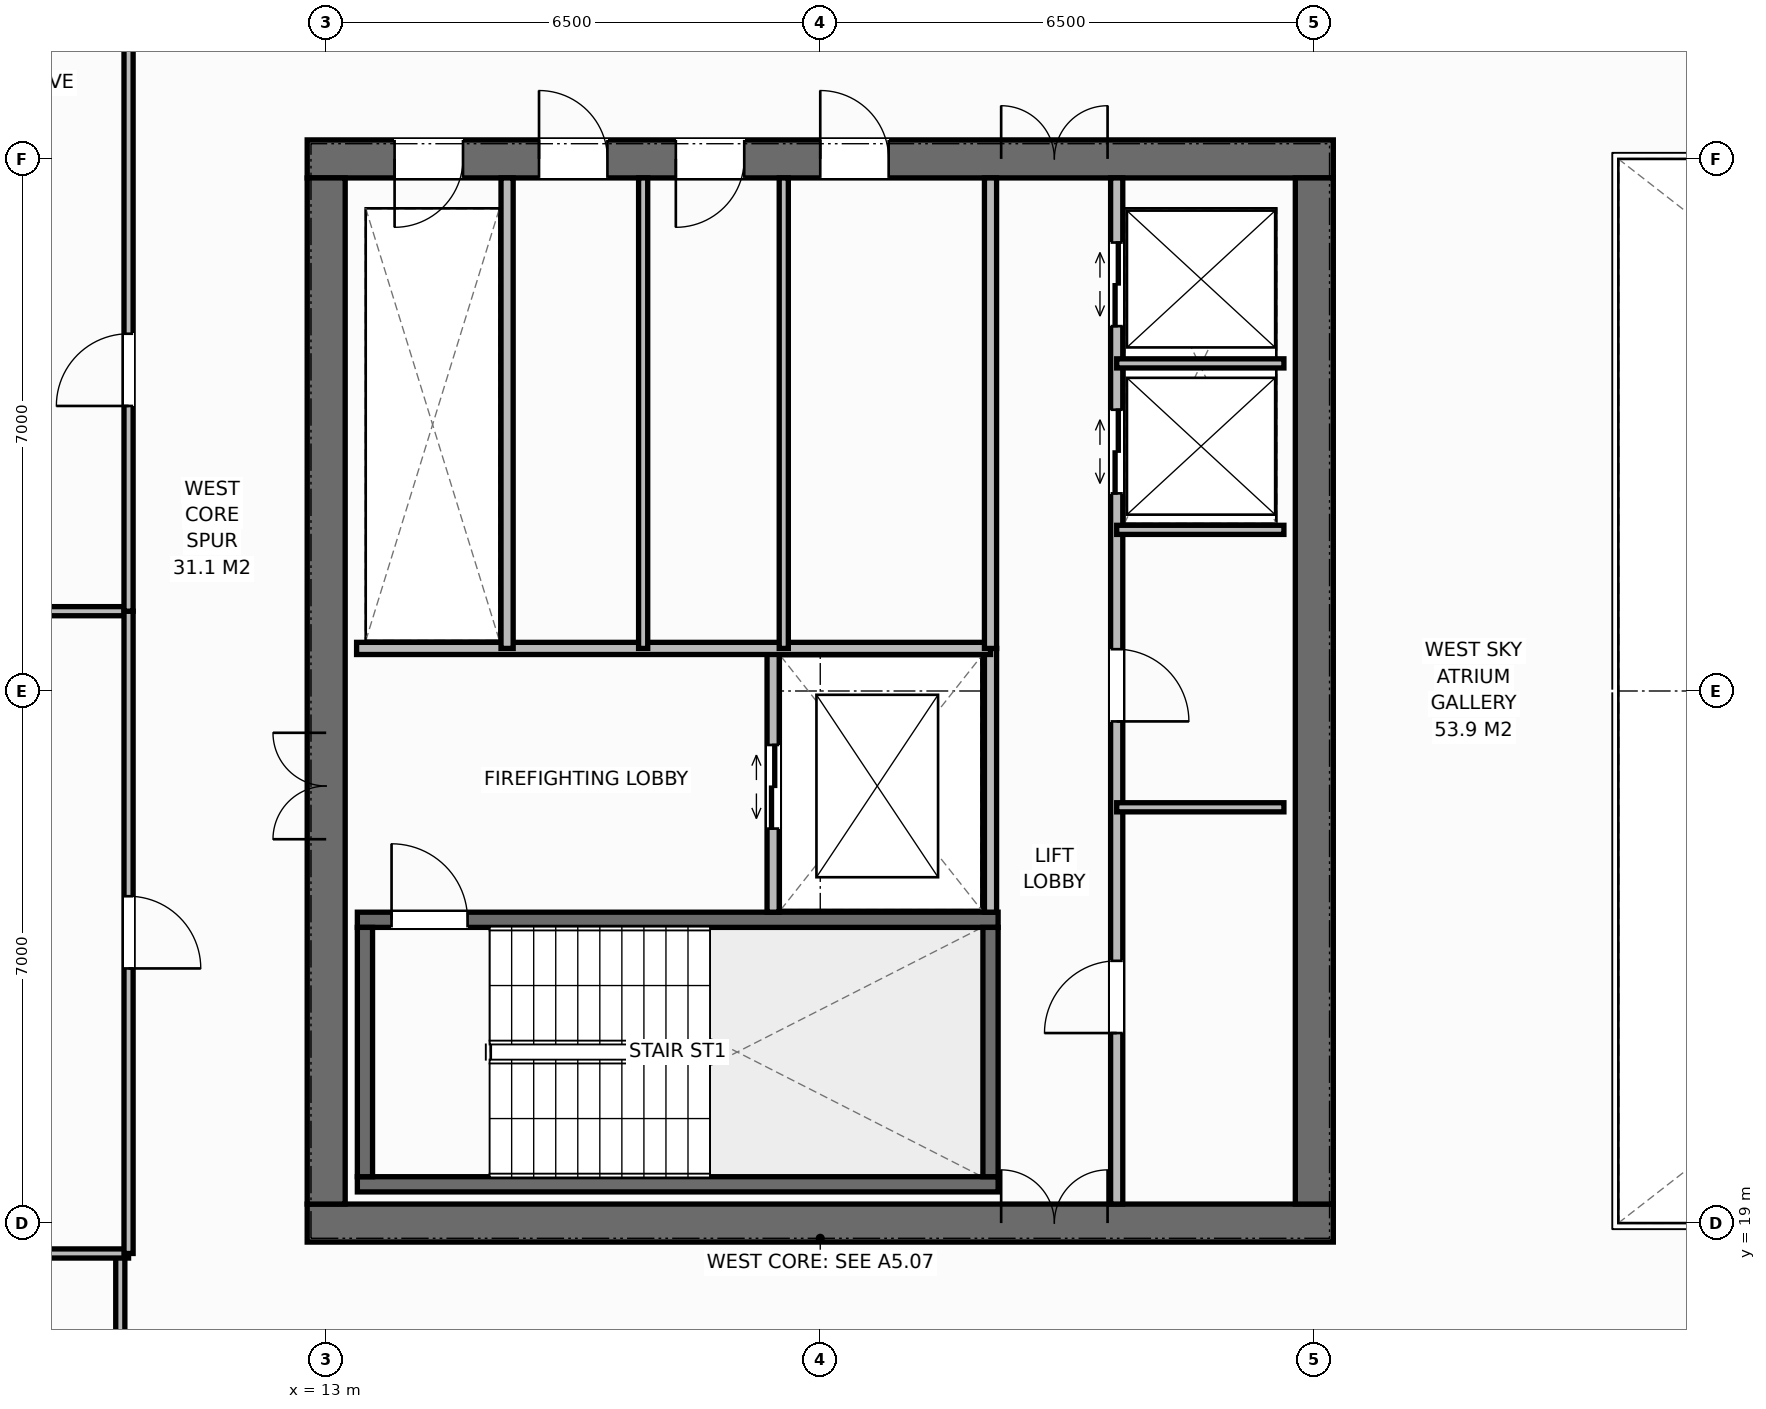
"""IFC4 building model, lengths in metres.
Left out: names, types, materials, properties, quantities, classifications, styles, units other than length and angle.
Written with IfcOpenShell. Run it as: python <this file> out.ifc"""

import sys

from ifc_helpers import new_model, si_unit, direction, frame, frame_2d, origin, place, context, subcontext, project, spatial, rectangle, extrude, element, fill, save


model = new_model("IFC4")
c1 = context("Model", 3, precision=1e-05, world=origin(), true_north=direction((0.0, 1.0)))
c2 = subcontext(c1, "Body", "Model", "MODEL_VIEW")
j1 = project(units=[si_unit("LENGTHUNIT", "METRE"), si_unit("PLANEANGLEUNIT", "RADIAN")], contexts=[c1])
p1 = place(None, origin())
s1 = spatial("IfcSite", under=j1, at=p1, CompositionType="ELEMENT")
p2 = place(p1, origin())
s2 = spatial("IfcBuilding", under=s1, at=p2, CompositionType="ELEMENT")
p3 = place(p2, frame((0.0, 0.0, 221.4)))
s3 = spatial("IfcBuildingStorey", under=s2, at=p3, CompositionType="ELEMENT", Elevation=221.4)
p4 = place(p3, frame((12.75, 19.0, 0.0), z_axis=(0.0, 0.0, 1.0), x_axis=(1.0, 0.0, 0.0)))
e1 = element("IfcWall", 1, at=p4, inside=s3, PredefinedType="SHEAR", context=c2, shape_type="SweptSolid", body=[
    extrude(rectangle(XDim=13.5, YDim=0.5, at=frame_2d((6.75, 0.0))), origin(), (0.0, 0.0, 1.0), 3.8),
])
p5 = place(p4, frame((9.13, 0.0, 0.0)))
e2 = element("IfcOpeningElement", 2, at=p5, cuts=e1, PredefinedType="OPENING", context=c2, shape_type="SweptSolid", body=[
    extrude(rectangle(XDim=1.4, YDim=2.2, at=frame_2d((0.7, 1.1))), frame((0.0, 0.26, 0.0), z_axis=(0.0, -1.0, 0.0), x_axis=(1.0, 0.0, 0.0)), (0.0, 0.0, 1.0), 0.52),
])
p6 = place(p3, frame((12.75, 33.0, 0.0), z_axis=(0.0, 0.0, 1.0), x_axis=(1.0, 0.0, 0.0)))
e3 = element("IfcWall", 3, at=p6, inside=s3, PredefinedType="SHEAR", context=c2, shape_type="SweptSolid", body=[
    extrude(rectangle(XDim=13.5, YDim=0.5, at=frame_2d((6.75, 0.0))), origin(), (0.0, 0.0, 1.0), 3.8),
])
p7 = place(p6, frame((1.15, 0.0, 0.0)))
e4 = element("IfcOpeningElement", 4, at=p7, cuts=e3, PredefinedType="OPENING", context=c2, shape_type="SweptSolid", body=[
    extrude(rectangle(XDim=0.9, YDim=2.15, at=frame_2d((0.45, 1.075))), frame((0.0, 0.26, 0.0), z_axis=(0.0, -1.0, 0.0), x_axis=(1.0, 0.0, 0.0)), (0.0, 0.0, 1.0), 0.52),
])
p8 = place(p6, frame((3.05, 0.0, 0.0)))
e5 = element("IfcOpeningElement", 5, at=p8, cuts=e3, PredefinedType="OPENING", context=c2, shape_type="SweptSolid", body=[
    extrude(rectangle(XDim=0.9, YDim=2.15, at=frame_2d((0.45, 1.075))), frame((0.0, 0.26, 0.0), z_axis=(0.0, -1.0, 0.0), x_axis=(1.0, 0.0, 0.0)), (0.0, 0.0, 1.0), 0.52),
])
p9 = place(p6, frame((4.85, 0.0, 0.0)))
e6 = element("IfcOpeningElement", 6, at=p9, cuts=e3, PredefinedType="OPENING", context=c2, shape_type="SweptSolid", body=[
    extrude(rectangle(XDim=0.9, YDim=2.15, at=frame_2d((0.45, 1.075))), frame((0.0, 0.26, 0.0), z_axis=(0.0, -1.0, 0.0), x_axis=(1.0, 0.0, 0.0)), (0.0, 0.0, 1.0), 0.52),
])
p10 = place(p6, frame((6.75, 0.0, 0.0)))
e7 = element("IfcOpeningElement", 7, at=p10, cuts=e3, PredefinedType="OPENING", context=c2, shape_type="SweptSolid", body=[
    extrude(rectangle(XDim=0.9, YDim=2.15, at=frame_2d((0.45, 1.075))), frame((0.0, 0.26, 0.0), z_axis=(0.0, -1.0, 0.0), x_axis=(1.0, 0.0, 0.0)), (0.0, 0.0, 1.0), 0.52),
])
p11 = place(p6, frame((9.13, 0.0, 0.0)))
e8 = element("IfcOpeningElement", 8, at=p11, cuts=e3, PredefinedType="OPENING", context=c2, shape_type="SweptSolid", body=[
    extrude(rectangle(XDim=1.4, YDim=2.2, at=frame_2d((0.7, 1.1))), frame((0.0, 0.26, 0.0), z_axis=(0.0, -1.0, 0.0), x_axis=(1.0, 0.0, 0.0)), (0.0, 0.0, 1.0), 0.52),
])
p12 = place(p3, frame((13.0, 19.25, 0.0), z_axis=(0.0, 0.0, 1.0), x_axis=(0.0, 1.0, 0.0)))
e9 = element("IfcWall", 9, at=p12, inside=s3, PredefinedType="SHEAR", context=c2, shape_type="SweptSolid", body=[
    extrude(rectangle(XDim=13.5, YDim=0.5, at=frame_2d((6.75, 0.0))), origin(), (0.0, 0.0, 1.0), 3.8),
])
p13 = place(p12, frame((4.8, 0.0, 0.0)))
e10 = element("IfcOpeningElement", 10, at=p13, cuts=e9, PredefinedType="OPENING", context=c2, shape_type="SweptSolid", body=[
    extrude(rectangle(XDim=1.4, YDim=2.2, at=frame_2d((0.7, 1.1))), frame((0.0, 0.26, 0.0), z_axis=(0.0, -1.0, 0.0), x_axis=(1.0, 0.0, 0.0)), (0.0, 0.0, 1.0), 0.52),
])
p14 = place(p3, frame((26.0, 19.25, 0.0), z_axis=(0.0, 0.0, 1.0), x_axis=(0.0, 1.0, 0.0)))
e11 = element("IfcWall", 11, at=p14, inside=s3, PredefinedType="SHEAR", context=c2, shape_type="SweptSolid", body=[
    extrude(rectangle(XDim=13.5, YDim=0.5, at=frame_2d((6.75, 0.0))), origin(), (0.0, 0.0, 1.0), 3.8),
])
p15 = place(p3, frame((13.41, 19.51, 0.0), z_axis=(0.0, 0.0, 1.0), x_axis=(1.0, 0.0, 0.0)))
e12 = element("IfcWall", 12, at=p15, inside=s3, PredefinedType="SHEAR", context=c2, shape_type="SweptSolid", body=[
    extrude(rectangle(XDim=8.43, YDim=0.2, at=frame_2d((4.215, 0.0))), origin(), (0.0, 0.0, 1.0), 3.8),
])
p16 = place(p3, frame((13.41, 22.99, 0.0), z_axis=(0.0, 0.0, 1.0), x_axis=(1.0, 0.0, 0.0)))
e13 = element("IfcWall", 13, at=p16, inside=s3, PredefinedType="SHEAR", context=c2, shape_type="SweptSolid", body=[
    extrude(rectangle(XDim=8.43, YDim=0.2, at=frame_2d((4.215, 0.0))), origin(), (0.0, 0.0, 1.0), 3.8),
])
p17 = place(p16, frame((0.45, 0.0, 0.0)))
e14 = element("IfcOpeningElement", 14, at=p17, cuts=e13, PredefinedType="OPENING", context=c2, shape_type="SweptSolid", body=[
    extrude(rectangle(XDim=1.0, YDim=2.15, at=frame_2d((0.5, 1.075))), frame((0.0, 0.11, 0.0), z_axis=(0.0, -1.0, 0.0), x_axis=(1.0, 0.0, 0.0)), (0.0, 0.0, 1.0), 0.22),
])
for number, where, z_axis, x_axis in (
    (15, (13.51, 19.61, 0.0), (0.0, 0.0, 1.0), (0.0, 1.0, 0.0)),
    (16, (21.74, 19.61, 0.0), (0.0, 0.0, 1.0), (0.0, 1.0, 0.0)),
):
    element("IfcWall", number, at=place(p3, frame(where, z_axis=z_axis, x_axis=x_axis)), inside=s3, PredefinedType="SHEAR", context=c2, shape_type="SweptSolid", body=[
        extrude(rectangle(XDim=3.28, YDim=0.2, at=frame_2d((1.64, 0.0))), origin(), (0.0, 0.0, 1.0), 3.8),
    ])
p18 = place(p3, frame((21.74, 23.09, 0.0), z_axis=(0.0, 0.0, 1.0), x_axis=(0.0, 1.0, 0.0)))
e17 = element("IfcWall", 17, at=p18, inside=s3, PredefinedType="STANDARD", context=c2, shape_type="SweptSolid", body=[
    extrude(rectangle(XDim=3.47, YDim=0.16, at=frame_2d((1.735, 0.0))), origin(), (0.0, 0.0, 1.0), 3.58),
])
p19 = place(p3, frame((18.88, 23.09, 0.0), z_axis=(0.0, 0.0, 1.0), x_axis=(0.0, 1.0, 0.0)))
e18 = element("IfcWall", 18, at=p19, inside=s3, PredefinedType="STANDARD", context=c2, shape_type="SweptSolid", body=[
    extrude(rectangle(XDim=3.47, YDim=0.16, at=frame_2d((1.735, 0.0))), origin(), (0.0, 0.0, 1.0), 3.58),
])
p20 = place(p19, frame((1.1, 0.0, 0.0)))
e19 = element("IfcOpeningElement", 19, at=p20, cuts=e18, PredefinedType="OPENING", context=c2, shape_type="SweptSolid", body=[
    extrude(rectangle(XDim=1.1, YDim=2.2, at=frame_2d((0.55, 1.1))), frame((0.0, 0.09, 0.0), z_axis=(0.0, -1.0, 0.0), x_axis=(1.0, 0.0, 0.0)), (0.0, 0.0, 1.0), 0.18),
])
p21 = place(p3, frame((13.4, 26.56, 0.0), z_axis=(0.0, 0.0, 1.0), x_axis=(1.0, 0.0, 0.0)))
e20 = element("IfcWall", 20, at=p21, inside=s3, PredefinedType="STANDARD", context=c2, shape_type="SweptSolid", body=[
    extrude(rectangle(XDim=8.34, YDim=0.16, at=frame_2d((4.17, 0.0))), origin(), (0.0, 0.0, 1.0), 3.58),
])
p22 = place(p3, frame((15.38, 26.56, 0.0), z_axis=(0.0, 0.0, 1.0), x_axis=(0.0, 1.0, 0.0)))
e21 = element("IfcWall", 21, at=p22, inside=s3, PredefinedType="STANDARD", context=c2, shape_type="SweptSolid", body=[
    extrude(rectangle(XDim=6.19, YDim=0.16, at=frame_2d((3.095, 0.0))), origin(), (0.0, 0.0, 1.0), 3.58),
])
for number, where, z_axis, x_axis in (
    (22, (17.17, 26.56, 0.0), (0.0, 0.0, 1.0), (0.0, 1.0, 0.0)),
    (23, (19.02, 26.56, 0.0), (0.0, 0.0, 1.0), (0.0, 1.0, 0.0)),
):
    element("IfcWall", number, at=place(p3, frame(where, z_axis=z_axis, x_axis=x_axis)), inside=s3, PredefinedType="PARTITIONING", context=c2, shape_type="SweptSolid", body=[
        extrude(rectangle(XDim=6.19, YDim=0.12, at=frame_2d((3.095, 0.0))), origin(), (0.0, 0.0, 1.0), 3.58),
    ])
p23 = place(p3, frame((21.74, 26.56, 0.0), z_axis=(0.0, 0.0, 1.0), x_axis=(0.0, 1.0, 0.0)))
e24 = element("IfcWall", 24, at=p23, inside=s3, PredefinedType="STANDARD", context=c2, shape_type="SweptSolid", body=[
    extrude(rectangle(XDim=6.19, YDim=0.16, at=frame_2d((3.095, 0.0))), origin(), (0.0, 0.0, 1.0), 3.58),
])
p24 = place(p3, frame((23.4, 19.25, 0.0), z_axis=(0.0, 0.0, 1.0), x_axis=(0.0, 1.0, 0.0)))
e25 = element("IfcWall", 25, at=p24, inside=s3, PredefinedType="STANDARD", context=c2, shape_type="SweptSolid", body=[
    extrude(rectangle(XDim=13.5, YDim=0.16, at=frame_2d((6.75, 0.0))), origin(), (0.0, 0.0, 1.0), 3.58),
])
p25 = place(p24, frame((2.25, 0.0, 0.0)))
e26 = element("IfcOpeningElement", 26, at=p25, cuts=e25, PredefinedType="OPENING", context=c2, shape_type="SweptSolid", body=[
    extrude(rectangle(XDim=0.95, YDim=2.15, at=frame_2d((0.475, 1.075))), frame((0.0, 0.09, 0.0), z_axis=(0.0, -1.0, 0.0), x_axis=(1.0, 0.0, 0.0)), (0.0, 0.0, 1.0), 0.18),
])
p26 = place(p24, frame((6.35, 0.0, 0.0)))
e27 = element("IfcOpeningElement", 27, at=p26, cuts=e25, PredefinedType="OPENING", context=c2, shape_type="SweptSolid", body=[
    extrude(rectangle(XDim=0.95, YDim=2.15, at=frame_2d((0.475, 1.075))), frame((0.0, 0.09, 0.0), z_axis=(0.0, -1.0, 0.0), x_axis=(1.0, 0.0, 0.0)), (0.0, 0.0, 1.0), 0.18),
])
p27 = place(p24, frame((9.35, 0.0, 0.0)))
e28 = element("IfcOpeningElement", 28, at=p27, cuts=e25, PredefinedType="OPENING", context=c2, shape_type="SweptSolid", body=[
    extrude(rectangle(XDim=1.1, YDim=2.2, at=frame_2d((0.55, 1.1))), frame((0.0, 0.09, 0.0), z_axis=(0.0, -1.0, 0.0), x_axis=(1.0, 0.0, 0.0)), (0.0, 0.0, 1.0), 0.18),
])
p28 = place(p24, frame((11.55, 0.0, 0.0)))
e29 = element("IfcOpeningElement", 29, at=p28, cuts=e25, PredefinedType="OPENING", context=c2, shape_type="SweptSolid", body=[
    extrude(rectangle(XDim=1.1, YDim=2.2, at=frame_2d((0.55, 1.1))), frame((0.0, 0.09, 0.0), z_axis=(0.0, -1.0, 0.0), x_axis=(1.0, 0.0, 0.0)), (0.0, 0.0, 1.0), 0.18),
])
for number, where, z_axis, x_axis in (
    (30, (23.4, 24.47, 0.0), (0.0, 0.0, 1.0), (1.0, 0.0, 0.0)),
    (31, (23.4, 28.12, 0.0), (0.0, 0.0, 1.0), (1.0, 0.0, 0.0)),
    (32, (23.4, 30.31, 0.0), (0.0, 0.0, 1.0), (1.0, 0.0, 0.0)),
):
    element("IfcWall", number, at=place(p3, frame(where, z_axis=z_axis, x_axis=x_axis)), inside=s3, PredefinedType="PARTITIONING", context=c2, shape_type="SweptSolid", body=[
        extrude(rectangle(XDim=2.2, YDim=0.12, at=frame_2d((1.1, 0.0))), origin(), (0.0, 0.0, 1.0), 3.58),
    ])
p29 = place(p3, frame((10.291, 16.5, 0.0), z_axis=(0.0, 0.0, 1.0), x_axis=(0.0, 1.0, 0.0)))
e33 = element("IfcWall", 33, at=p29, inside=s3, PredefinedType="PARTITIONING", context=c2, shape_type="SweptSolid", body=[
    extrude(rectangle(XDim=2.1, YDim=0.12, at=frame_2d((1.05, 0.0))), origin(), (0.0, 0.0, 1.0), 3.58),
])
for number, where, z_axis, x_axis in (
    (34, (5.82, 18.6, 0.0), (0.0, 0.0, 1.0), (1.0, 0.0, 0.0)),
    (35, (5.82, 27.05, 0.0), (0.0, 0.0, 1.0), (1.0, 0.0, 0.0)),
):
    element("IfcWall", number, at=place(p3, frame(where, z_axis=z_axis, x_axis=x_axis)), inside=s3, PredefinedType="PARTITIONING", context=c2, shape_type="SweptSolid", body=[
        extrude(rectangle(XDim=4.58, YDim=0.12, at=frame_2d((2.29, 0.0))), origin(), (0.0, 0.0, 1.0), 3.58),
    ])
p30 = place(p3, frame((10.4, 18.6, 0.0), z_axis=(0.0, 0.0, 1.0), x_axis=(0.0, 1.0, 0.0)))
e36 = element("IfcWall", 36, at=p30, inside=s3, PredefinedType="PARTITIONING", context=c2, shape_type="SweptSolid", body=[
    extrude(rectangle(XDim=8.45, YDim=0.12, at=frame_2d((4.225, 0.0))), origin(), (0.0, 0.0, 1.0), 3.58),
])
p31 = place(p30, frame((3.75, 0.0, 0.0)))
e37 = element("IfcOpeningElement", 37, at=p31, cuts=e36, PredefinedType="OPENING", context=c2, shape_type="SweptSolid", body=[
    extrude(rectangle(XDim=0.95, YDim=2.15, at=frame_2d((0.475, 1.075))), frame((0.0, 0.07, 0.0), z_axis=(0.0, -1.0, 0.0), x_axis=(1.0, 0.0, 0.0)), (0.0, 0.0, 1.0), 0.14),
])
p32 = place(p3, frame((10.4, 27.05, 0.0), z_axis=(0.0, 0.0, 1.0), x_axis=(0.0, 1.0, 0.0)))
e38 = element("IfcWall", 38, at=p32, inside=s3, PredefinedType="PARTITIONING", context=c2, shape_type="SweptSolid", body=[
    extrude(rectangle(XDim=8.45, YDim=0.12, at=frame_2d((4.225, 0.0))), origin(), (0.0, 0.0, 1.0), 3.58),
])
p33 = place(p32, frame((2.7, 0.0, 0.0)))
e39 = element("IfcOpeningElement", 39, at=p33, cuts=e38, PredefinedType="OPENING", context=c2, shape_type="SweptSolid", body=[
    extrude(rectangle(XDim=0.95, YDim=2.15, at=frame_2d((0.475, 1.075))), frame((0.0, 0.07, 0.0), z_axis=(0.0, -1.0, 0.0), x_axis=(1.0, 0.0, 0.0)), (0.0, 0.0, 1.0), 0.14),
])
p34 = place(p17, origin())
e40 = element("IfcDoor", 40, at=p34, inside=s3, OperationType="SINGLE_SWING_LEFT", PredefinedType="DOOR", context=c2, shape_type="SweptSolid", body=[
    extrude(rectangle(XDim=1.0, YDim=2.15, at=frame_2d((0.5, 1.075))), frame((0.0, 0.025, 0.0), z_axis=(0.0, -1.0, 0.0), x_axis=(1.0, 0.0, 0.0)), (0.0, 0.0, 1.0), 0.05),
])
fill(e14, e40)
p35 = place(p13, origin())
e41 = element("IfcDoor", 41, at=p35, inside=s3, OperationType="DOUBLE_DOOR_SINGLE_SWING", PredefinedType="DOOR", context=c2, shape_type="SweptSolid", body=[
    extrude(rectangle(XDim=1.4, YDim=2.2, at=frame_2d((0.7, 1.1))), frame((0.0, 0.025, 0.0), z_axis=(0.0, -1.0, 0.0), x_axis=(1.0, 0.0, 0.0)), (0.0, 0.0, 1.0), 0.05),
])
fill(e10, e41)
p36 = place(p20, origin())
e42 = element("IfcDoor", 42, at=p36, inside=s3, OperationType="DOUBLE_DOOR_SLIDING", PredefinedType="DOOR", context=c2, shape_type="SweptSolid", body=[
    extrude(rectangle(XDim=1.1, YDim=2.2, at=frame_2d((0.55, 1.1))), frame((0.0, 0.025, 0.0), z_axis=(0.0, -1.0, 0.0), x_axis=(1.0, 0.0, 0.0)), (0.0, 0.0, 1.0), 0.05),
])
fill(e19, e42)
p37 = place(p7, origin())
e43 = element("IfcDoor", 43, at=p37, inside=s3, OperationType="SINGLE_SWING_RIGHT", PredefinedType="DOOR", context=c2, shape_type="SweptSolid", body=[
    extrude(rectangle(XDim=0.9, YDim=2.15, at=frame_2d((0.45, 1.075))), frame((0.0, -0.025, 0.0), z_axis=(0.0, -1.0, 0.0), x_axis=(1.0, 0.0, 0.0)), (0.0, 0.0, 1.0), 0.05),
])
fill(e4, e43)
p38 = place(p8, origin())
e44 = element("IfcDoor", 44, at=p38, inside=s3, OperationType="SINGLE_SWING_LEFT", PredefinedType="DOOR", context=c2, shape_type="SweptSolid", body=[
    extrude(rectangle(XDim=0.9, YDim=2.15, at=frame_2d((0.45, 1.075))), frame((0.0, -0.025, 0.0), z_axis=(0.0, -1.0, 0.0), x_axis=(1.0, 0.0, 0.0)), (0.0, 0.0, 1.0), 0.05),
])
fill(e5, e44)
p39 = place(p9, origin())
e45 = element("IfcDoor", 45, at=p39, inside=s3, OperationType="SINGLE_SWING_RIGHT", PredefinedType="DOOR", context=c2, shape_type="SweptSolid", body=[
    extrude(rectangle(XDim=0.9, YDim=2.15, at=frame_2d((0.45, 1.075))), frame((0.0, -0.025, 0.0), z_axis=(0.0, -1.0, 0.0), x_axis=(1.0, 0.0, 0.0)), (0.0, 0.0, 1.0), 0.05),
])
fill(e6, e45)
p40 = place(p10, origin())
e46 = element("IfcDoor", 46, at=p40, inside=s3, OperationType="SINGLE_SWING_LEFT", PredefinedType="DOOR", context=c2, shape_type="SweptSolid", body=[
    extrude(rectangle(XDim=0.9, YDim=2.15, at=frame_2d((0.45, 1.075))), frame((0.0, -0.025, 0.0), z_axis=(0.0, -1.0, 0.0), x_axis=(1.0, 0.0, 0.0)), (0.0, 0.0, 1.0), 0.05),
])
fill(e7, e46)
p41 = place(p5, origin())
e47 = element("IfcDoor", 47, at=p41, inside=s3, OperationType="DOUBLE_DOOR_SINGLE_SWING", PredefinedType="DOOR", context=c2, shape_type="SweptSolid", body=[
    extrude(rectangle(XDim=1.4, YDim=2.2, at=frame_2d((0.7, 1.1))), frame((0.0, 0.075, 0.0), z_axis=(0.0, -1.0, 0.0), x_axis=(1.0, 0.0, 0.0)), (0.0, 0.0, 1.0), 0.05),
])
fill(e2, e47)
p42 = place(p11, origin())
e48 = element("IfcDoor", 48, at=p42, inside=s3, OperationType="DOUBLE_DOOR_SINGLE_SWING", PredefinedType="DOOR", context=c2, shape_type="SweptSolid", body=[
    extrude(rectangle(XDim=1.4, YDim=2.2, at=frame_2d((0.7, 1.1))), frame((0.0, -0.025, 0.0), z_axis=(0.0, -1.0, 0.0), x_axis=(1.0, 0.0, 0.0)), (0.0, 0.0, 1.0), 0.05),
])
fill(e8, e48)
p43 = place(p25, origin())
e49 = element("IfcDoor", 49, at=p43, inside=s3, OperationType="SINGLE_SWING_LEFT", PredefinedType="DOOR", context=c2, shape_type="SweptSolid", body=[
    extrude(rectangle(XDim=0.95, YDim=2.15, at=frame_2d((0.475, 1.075))), frame((0.0, 0.025, 0.0), z_axis=(0.0, -1.0, 0.0), x_axis=(1.0, 0.0, 0.0)), (0.0, 0.0, 1.0), 0.05),
])
fill(e26, e49)
p44 = place(p26, origin())
e50 = element("IfcDoor", 50, at=p44, inside=s3, OperationType="SINGLE_SWING_RIGHT", PredefinedType="DOOR", context=c2, shape_type="SweptSolid", body=[
    extrude(rectangle(XDim=0.95, YDim=2.15, at=frame_2d((0.475, 1.075))), frame((0.0, 0.025, 0.0), z_axis=(0.0, -1.0, 0.0), x_axis=(1.0, 0.0, 0.0)), (0.0, 0.0, 1.0), 0.05),
])
fill(e27, e50)
p45 = place(p27, origin())
e51 = element("IfcDoor", 51, at=p45, inside=s3, OperationType="DOUBLE_DOOR_SLIDING", PredefinedType="DOOR", context=c2, shape_type="SweptSolid", body=[
    extrude(rectangle(XDim=1.1, YDim=2.2, at=frame_2d((0.55, 1.1))), frame((0.0, 0.025, 0.0), z_axis=(0.0, -1.0, 0.0), x_axis=(1.0, 0.0, 0.0)), (0.0, 0.0, 1.0), 0.05),
])
fill(e28, e51)
p46 = place(p28, origin())
e52 = element("IfcDoor", 52, at=p46, inside=s3, OperationType="DOUBLE_DOOR_SLIDING", PredefinedType="DOOR", context=c2, shape_type="SweptSolid", body=[
    extrude(rectangle(XDim=1.1, YDim=2.2, at=frame_2d((0.55, 1.1))), frame((0.0, 0.025, 0.0), z_axis=(0.0, -1.0, 0.0), x_axis=(1.0, 0.0, 0.0)), (0.0, 0.0, 1.0), 0.05),
])
fill(e29, e52)
p47 = place(p31, origin())
e53 = element("IfcDoor", 53, at=p47, inside=s3, OperationType="SINGLE_SWING_RIGHT", PredefinedType="DOOR", context=c2, shape_type="SweptSolid", body=[
    extrude(rectangle(XDim=0.95, YDim=2.15, at=frame_2d((0.475, 1.075))), frame((0.0, 0.025, 0.0), z_axis=(0.0, -1.0, 0.0), x_axis=(1.0, 0.0, 0.0)), (0.0, 0.0, 1.0), 0.05),
])
fill(e37, e53)
p48 = place(p33, origin())
e54 = element("IfcDoor", 54, at=p48, inside=s3, OperationType="SINGLE_SWING_LEFT", PredefinedType="DOOR", context=c2, shape_type="SweptSolid", body=[
    extrude(rectangle(XDim=0.95, YDim=2.15, at=frame_2d((0.475, 1.075))), frame((0.0, 0.025, 0.0), z_axis=(0.0, -1.0, 0.0), x_axis=(1.0, 0.0, 0.0)), (0.0, 0.0, 1.0), 0.05),
])
fill(e39, e54)
save(model, sys.argv[1])
